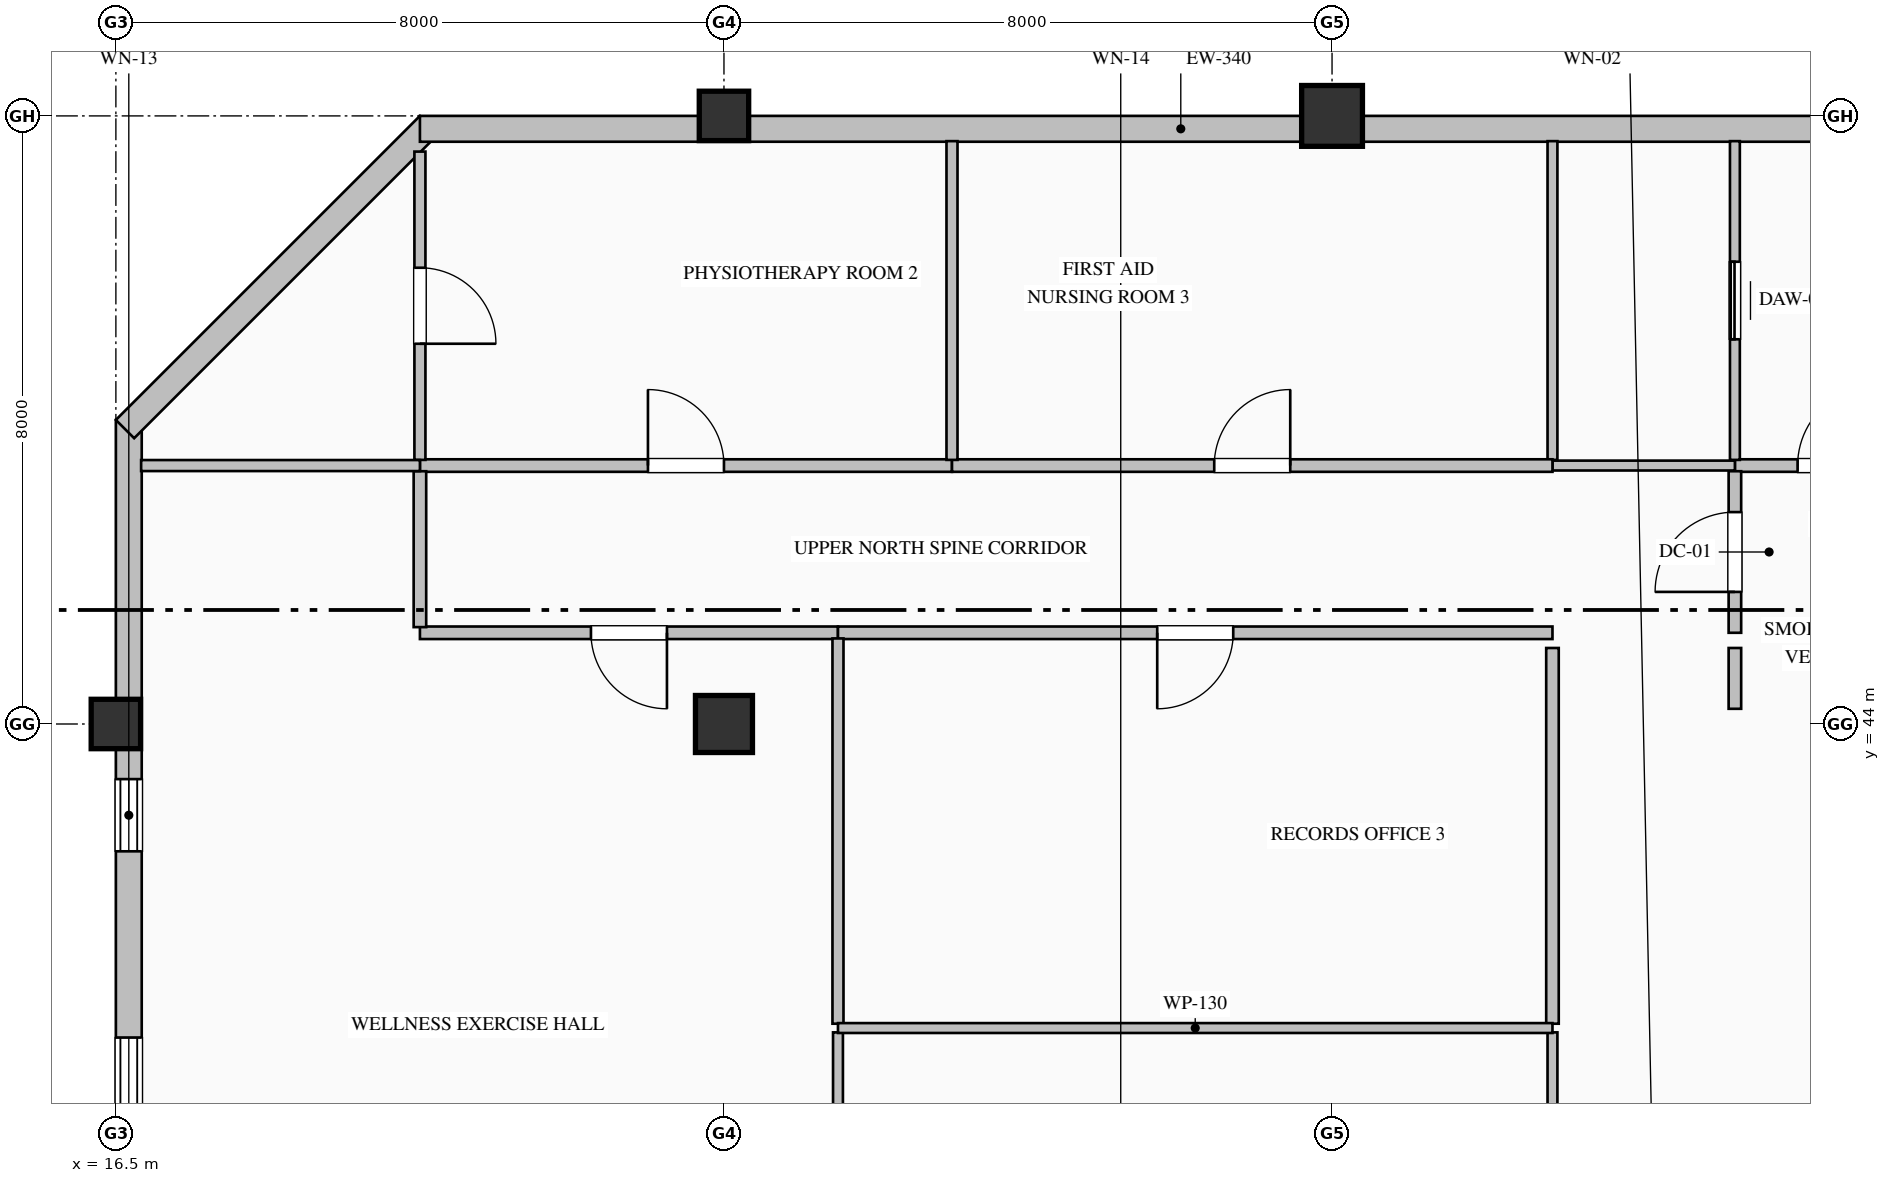
"""IFC4 building model, lengths in metres.
Left out: names, types, materials, properties, quantities, classifications, styles, units other than length and angle.
Written with IfcOpenShell. Run it as: python <this file> out.ifc"""

import sys

from ifc_helpers import new_model, si_unit, direction, frame, frame_2d, origin, origin_2d, place, context, subcontext, project, spatial, rectangle, hollow_rectangle, extrude, element, fill, save


model = new_model("IFC4")
c1 = context("Model", 3, precision=1e-05, world=origin(), true_north=direction((0.0, 1.0)))
c2 = subcontext(c1, "Body", "Model", "MODEL_VIEW")
j1 = project(units=[si_unit("LENGTHUNIT", "METRE"), si_unit("PLANEANGLEUNIT", "RADIAN")], contexts=[c1])
p1 = place(None, origin())
s1 = spatial("IfcSite", under=j1, at=p1, CompositionType="ELEMENT")
p2 = place(p1, origin())
s2 = spatial("IfcBuilding", under=s1, at=p2, CompositionType="ELEMENT")
p3 = place(p2, frame((0.0, 0.0, 339.2)))
s3 = spatial("IfcBuildingStorey", under=s2, at=p3, CompositionType="ELEMENT", Elevation=339.2)
p4 = place(p3, frame((16.5, 44.0, 0.0), z_axis=(0.0, 0.0, 1.0), x_axis=(1.0, 0.0, 0.0)))
e1 = element("IfcColumn", 1, at=p4, inside=s3, PredefinedType="COLUMN", context=c2, shape_type="SweptSolid", body=[
    extrude(hollow_rectangle(XDim=0.65, YDim=0.65, WallThickness=0.028, at=origin_2d()), origin(), (0.0, 0.0, 1.0), 4.0),
])
p5 = place(p3, frame((24.5, 44.0, 0.0), z_axis=(0.0, 0.0, 1.0), x_axis=(1.0, 0.0, 0.0)))
e2 = element("IfcColumn", 2, at=p5, inside=s3, PredefinedType="COLUMN", context=c2, shape_type="SweptSolid", body=[
    extrude(rectangle(XDim=0.75, YDim=0.75, at=origin_2d()), origin(), (0.0, 0.0, 1.0), 4.0),
])
p6 = place(p3, frame((24.5, 52.0, 0.0), z_axis=(0.0, 0.0, 1.0), x_axis=(1.0, 0.0, 0.0)))
e3 = element("IfcColumn", 3, at=p6, inside=s3, PredefinedType="COLUMN", context=c2, shape_type="SweptSolid", body=[
    extrude(hollow_rectangle(XDim=0.65, YDim=0.65, WallThickness=0.028, at=origin_2d()), origin(), (0.0, 0.0, 1.0), 4.0),
])
p7 = place(p3, frame((32.5, 52.0, 0.0), z_axis=(0.0, 0.0, 1.0), x_axis=(1.0, 0.0, 0.0)))
e4 = element("IfcColumn", 4, at=p7, inside=s3, PredefinedType="COLUMN", context=c2, shape_type="SweptSolid", body=[
    extrude(hollow_rectangle(XDim=0.8, YDim=0.8, WallThickness=0.032, at=origin_2d()), origin(), (0.0, 0.0, 1.0), 4.0),
])
p8 = place(p3, frame((16.67, 32.0, 0.0), z_axis=(0.0, 0.0, 1.0), x_axis=(0.0, 1.0, 0.0)))
e5 = element("IfcWall", 5, at=p8, inside=s3, PredefinedType="SOLIDWALL", context=c2, shape_type="SweptSolid", body=[
    extrude(rectangle(XDim=16.0, YDim=0.34, at=frame_2d((8.0, 0.0))), origin(), (0.0, 0.0, 1.0), 3.335),
])
p9 = place(p8, frame((6.525, 0.0, 0.9)))
e6 = element("IfcOpeningElement", 6, at=p9, cuts=e5, PredefinedType="OPENING", context=c2, shape_type="SweptSolid", body=[
    extrude(rectangle(XDim=1.35, YDim=1.85, at=frame_2d((0.675, 0.925))), frame((0.0, 0.18, 0.0), z_axis=(0.0, -1.0, 0.0), x_axis=(1.0, 0.0, 0.0)), (0.0, 0.0, 1.0), 0.36),
])
p10 = place(p8, frame((10.325, 0.0, 0.9)))
e7 = element("IfcOpeningElement", 7, at=p10, cuts=e5, PredefinedType="OPENING", context=c2, shape_type="SweptSolid", body=[
    extrude(rectangle(XDim=0.95, YDim=1.85, at=frame_2d((0.475, 0.925))), frame((0.0, 0.18, 0.0), z_axis=(0.0, -1.0, 0.0), x_axis=(1.0, 0.0, 0.0)), (0.0, 0.0, 1.0), 0.36),
])
p11 = place(p3, frame((16.62, 47.88, 0.0), z_axis=(0.0, 0.0, 1.0), x_axis=(0.707106781187, 0.707106781187, 0.0)))
e8 = element("IfcWall", 8, at=p11, inside=s3, PredefinedType="SOLIDWALL", context=c2, shape_type="SweptSolid", body=[
    extrude(rectangle(XDim=5.657, YDim=0.34, at=frame_2d((2.828, 0.0))), origin(), (0.0, 0.0, 1.0), 3.785),
])
p12 = place(p3, frame((20.5, 51.83, 0.0), z_axis=(0.0, 0.0, 1.0), x_axis=(1.0, 0.0, 0.0)))
e9 = element("IfcWall", 9, at=p12, inside=s3, PredefinedType="SOLIDWALL", context=c2, shape_type="SweptSolid", body=[
    extrude(rectangle(XDim=20.02, YDim=0.34, at=frame_2d((10.01, 0.0))), origin(), (0.0, 0.0, 1.0), 3.335),
])
p13 = place(p3, frame((37.8, 47.4, 0.0), z_axis=(0.0, 0.0, 1.0), x_axis=(1.0, 0.0, 0.0)))
e10 = element("IfcWall", 10, at=p13, inside=s3, PredefinedType="PARTITIONING", context=c2, shape_type="SweptSolid", body=[
    extrude(rectangle(XDim=2.7, YDim=0.165, at=frame_2d((1.35, 0.0))), origin(), (0.0, 0.0, 1.0), 3.785),
])
p14 = place(p13, frame((0.825, 0.0, 0.0)))
e11 = element("IfcOpeningElement", 11, at=p14, cuts=e10, PredefinedType="OPENING", context=c2, shape_type="SweptSolid", body=[
    extrude(rectangle(XDim=1.05, YDim=2.15, at=frame_2d((0.525, 1.075))), frame((0.0, 0.093, 0.0), z_axis=(0.0, -1.0, 0.0), x_axis=(1.0, 0.0, 0.0)), (0.0, 0.0, 1.0), 0.185),
])
p15 = place(p3, frame((37.8, 45.2, 0.0), z_axis=(0.0, 0.0, 1.0), x_axis=(0.0, 1.0, 0.0)))
e12 = element("IfcWall", 12, at=p15, inside=s3, PredefinedType="PARTITIONING", context=c2, shape_type="SweptSolid", body=[
    extrude(rectangle(XDim=2.125, YDim=0.165, at=frame_2d((1.063, 0.0))), origin(), (0.0, 0.0, 1.0), 3.785),
])
p16 = place(p15, frame((0.538, 0.0, 0.0)))
e13 = element("IfcOpeningElement", 13, at=p16, cuts=e12, PredefinedType="OPENING", context=c2, shape_type="SweptSolid", body=[
    extrude(rectangle(XDim=1.05, YDim=2.15, at=frame_2d((0.525, 1.075))), frame((0.0, 0.093, 0.0), z_axis=(0.0, -1.0, 0.0), x_axis=(1.0, 0.0, 0.0)), (0.0, 0.0, 1.0), 0.185),
])
p17 = place(p3, frame((37.8, 44.2, 0.0), z_axis=(0.0, 0.0, 1.0), x_axis=(0.0, 1.0, 0.0)))
e14 = element("IfcWall", 14, at=p17, inside=s3, PredefinedType="PARTITIONING", context=c2, shape_type="SweptSolid", body=[
    extrude(rectangle(XDim=0.8, YDim=0.165, at=frame_2d((0.4, 0.0))), origin(), (0.0, 0.0, 1.0), 3.785),
])
p18 = place(p3, frame((37.8, 47.475, 0.0), z_axis=(0.0, 0.0, 1.0), x_axis=(0.0, 1.0, 0.0)))
e15 = element("IfcWall", 15, at=p18, inside=s3, PredefinedType="PARTITIONING", context=c2, shape_type="SweptSolid", body=[
    extrude(rectangle(XDim=4.193, YDim=0.13, at=frame_2d((2.097, 0.0))), origin(), (0.0, 0.0, 1.0), 3.785),
])
p19 = place(p18, frame((1.587, 0.0, 0.0)))
e16 = element("IfcOpeningElement", 16, at=p19, cuts=e15, PredefinedType="OPENING", context=c2, shape_type="SweptSolid", body=[
    extrude(rectangle(XDim=1.02, YDim=2.15, at=frame_2d((0.51, 1.075))), frame((0.0, 0.075, 0.0), z_axis=(0.0, -1.0, 0.0), x_axis=(1.0, 0.0, 0.0)), (0.0, 0.0, 1.0), 0.15),
])
p20 = place(p3, frame((37.8, 47.4, 0.0), z_axis=(0.0, 0.0, 1.0), x_axis=(-1.0, 0.0, 0.0)))
e17 = element("IfcWall", 17, at=p20, inside=s3, PredefinedType="PARTITIONING", context=c2, shape_type="SweptSolid", body=[
    extrude(rectangle(XDim=2.4, YDim=0.13, at=frame_2d((1.2, 0.0))), origin(), (0.0, 0.0, 1.0), 3.785),
])
p21 = place(p3, frame((35.4, 47.475, 0.0), z_axis=(0.0, 0.0, 1.0), x_axis=(0.0, 1.0, 0.0)))
e18 = element("IfcWall", 18, at=p21, inside=s3, PredefinedType="PARTITIONING", context=c2, shape_type="SweptSolid", body=[
    extrude(rectangle(XDim=4.193, YDim=0.13, at=frame_2d((2.097, 0.0))), origin(), (0.0, 0.0, 1.0), 3.785),
])
p22 = place(p3, frame((20.5, 47.4, 0.0), z_axis=(0.0, 0.0, 1.0), x_axis=(1.0, 0.0, 0.0)))
e19 = element("IfcWall", 19, at=p22, inside=s3, PredefinedType="PARTITIONING", context=c2, shape_type="SweptSolid", body=[
    extrude(rectangle(XDim=7.0, YDim=0.165, at=frame_2d((3.5, 0.0))), origin(), (0.0, 0.0, 1.0), 3.785),
])
p23 = place(p22, frame((3.0, 0.0, 0.0)))
e20 = element("IfcOpeningElement", 20, at=p23, cuts=e19, PredefinedType="OPENING", context=c2, shape_type="SweptSolid", body=[
    extrude(rectangle(XDim=1.0, YDim=2.15, at=frame_2d((0.5, 1.075))), frame((0.0, 0.093, 0.0), z_axis=(0.0, -1.0, 0.0), x_axis=(1.0, 0.0, 0.0)), (0.0, 0.0, 1.0), 0.185),
])
p24 = place(p3, frame((27.5, 47.4, 0.0), z_axis=(0.0, 0.0, 1.0), x_axis=(1.0, 0.0, 0.0)))
e21 = element("IfcWall", 21, at=p24, inside=s3, PredefinedType="PARTITIONING", context=c2, shape_type="SweptSolid", body=[
    extrude(rectangle(XDim=7.9, YDim=0.165, at=frame_2d((3.95, 0.0))), origin(), (0.0, 0.0, 1.0), 3.785),
])
p25 = place(p24, frame((3.45, 0.0, 0.0)))
e22 = element("IfcOpeningElement", 22, at=p25, cuts=e21, PredefinedType="OPENING", context=c2, shape_type="SweptSolid", body=[
    extrude(rectangle(XDim=1.0, YDim=2.15, at=frame_2d((0.5, 1.075))), frame((0.0, 0.093, 0.0), z_axis=(0.0, -1.0, 0.0), x_axis=(1.0, 0.0, 0.0)), (0.0, 0.0, 1.0), 0.185),
])
p26 = place(p3, frame((26.0, 45.2, 0.0), z_axis=(0.0, 0.0, 1.0), x_axis=(-1.0, 0.0, 0.0)))
e23 = element("IfcWall", 23, at=p26, inside=s3, PredefinedType="PARTITIONING", context=c2, shape_type="SweptSolid", body=[
    extrude(rectangle(XDim=5.5, YDim=0.165, at=frame_2d((2.75, 0.0))), origin(), (0.0, 0.0, 1.0), 3.785),
])
p27 = place(p26, frame((2.25, 0.0, 0.0)))
e24 = element("IfcOpeningElement", 24, at=p27, cuts=e23, PredefinedType="OPENING", context=c2, shape_type="SweptSolid", body=[
    extrude(rectangle(XDim=1.0, YDim=2.15, at=frame_2d((0.5, 1.075))), frame((0.0, 0.093, 0.0), z_axis=(0.0, -1.0, 0.0), x_axis=(1.0, 0.0, 0.0)), (0.0, 0.0, 1.0), 0.185),
])
p28 = place(p3, frame((20.5, 45.274, 0.0), z_axis=(0.0, 0.0, 1.0), x_axis=(0.0, 1.0, 0.0)))
e25 = element("IfcWall", 25, at=p28, inside=s3, PredefinedType="PARTITIONING", context=c2, shape_type="SweptSolid", body=[
    extrude(rectangle(XDim=2.051, YDim=0.165, at=frame_2d((1.025, 0.0))), origin(), (0.0, 0.0, 1.0), 3.785),
])
p29 = place(p3, frame((35.4, 45.2, 0.0), z_axis=(0.0, 0.0, 1.0), x_axis=(-1.0, 0.0, 0.0)))
e26 = element("IfcWall", 26, at=p29, inside=s3, PredefinedType="PARTITIONING", context=c2, shape_type="SweptSolid", body=[
    extrude(rectangle(XDim=9.4, YDim=0.165, at=frame_2d((4.7, 0.0))), origin(), (0.0, 0.0, 1.0), 3.785),
])
p30 = place(p29, frame((4.2, 0.0, 0.0)))
e27 = element("IfcOpeningElement", 27, at=p30, cuts=e26, PredefinedType="OPENING", context=c2, shape_type="SweptSolid", body=[
    extrude(rectangle(XDim=1.0, YDim=2.15, at=frame_2d((0.5, 1.075))), frame((0.0, 0.093, 0.0), z_axis=(0.0, -1.0, 0.0), x_axis=(1.0, 0.0, 0.0)), (0.0, 0.0, 1.0), 0.185),
])
p31 = place(p3, frame((35.4, 34.057, 0.0), z_axis=(0.0, 0.0, 1.0), x_axis=(0.0, 1.0, 0.0)))
e28 = element("IfcWall", 28, at=p31, inside=s3, PredefinedType="PARTITIONING", context=c2, shape_type="SweptSolid", body=[
    extrude(rectangle(XDim=5.886, YDim=0.13, at=frame_2d((2.943, 0.0))), origin(), (0.0, 0.0, 1.0), 3.785),
])
p32 = place(p31, frame((2.443, 0.0, 0.0)))
e29 = element("IfcOpeningElement", 29, at=p32, cuts=e28, PredefinedType="OPENING", context=c2, shape_type="SweptSolid", body=[
    extrude(rectangle(XDim=1.0, YDim=2.15, at=frame_2d((0.5, 1.075))), frame((0.0, 0.075, 0.0), z_axis=(0.0, -1.0, 0.0), x_axis=(1.0, 0.0, 0.0)), (0.0, 0.0, 1.0), 0.15),
])
p33 = place(p3, frame((35.4, 40.057, 0.0), z_axis=(0.0, 0.0, 1.0), x_axis=(0.0, 1.0, 0.0)))
e30 = element("IfcWall", 30, at=p33, inside=s3, PredefinedType="PARTITIONING", context=c2, shape_type="SweptSolid", body=[
    extrude(rectangle(XDim=4.943, YDim=0.165, at=frame_2d((2.472, 0.0))), origin(), (0.0, 0.0, 1.0), 3.785),
])
p34 = place(p3, frame((20.5, 51.531, 0.0), z_axis=(0.0, 0.0, 1.0), x_axis=(0.0, -1.0, 0.0)))
e31 = element("IfcWall", 31, at=p34, inside=s3, PredefinedType="PARTITIONING", context=c2, shape_type="SweptSolid", body=[
    extrude(rectangle(XDim=4.056, YDim=0.145, at=frame_2d((2.028, 0.0))), origin(), (0.0, 0.0, 1.0), 3.785),
])
p35 = place(p34, frame((1.528, 0.0, 0.0)))
e32 = element("IfcOpeningElement", 32, at=p35, cuts=e31, PredefinedType="OPENING", context=c2, shape_type="SweptSolid", body=[
    extrude(rectangle(XDim=1.0, YDim=2.15, at=frame_2d((0.5, 1.075))), frame((0.0, 0.083, 0.0), z_axis=(0.0, -1.0, 0.0), x_axis=(1.0, 0.0, 0.0)), (0.0, 0.0, 1.0), 0.165),
])
p36 = place(p3, frame((20.5, 47.4, 0.0), z_axis=(0.0, 0.0, 1.0), x_axis=(-1.0, 0.0, 0.0)))
e33 = element("IfcWall", 33, at=p36, inside=s3, PredefinedType="PARTITIONING", context=c2, shape_type="SweptSolid", body=[
    extrude(rectangle(XDim=3.668, YDim=0.145, at=frame_2d((1.834, 0.0))), origin(), (0.0, 0.0, 1.0), 3.785),
])
p37 = place(p3, frame((27.5, 51.668, 0.0), z_axis=(0.0, 0.0, 1.0), x_axis=(0.0, -1.0, 0.0)))
e34 = element("IfcWall", 34, at=p37, inside=s3, PredefinedType="PARTITIONING", context=c2, shape_type="SweptSolid", body=[
    extrude(rectangle(XDim=4.193, YDim=0.145, at=frame_2d((2.097, 0.0))), origin(), (0.0, 0.0, 1.0), 3.785),
])
p38 = place(p3, frame((26.0, 39.943, 0.0), z_axis=(0.0, 0.0, 1.0), x_axis=(0.0, -1.0, 0.0)))
e35 = element("IfcWall", 35, at=p38, inside=s3, PredefinedType="PARTITIONING", context=c2, shape_type="SweptSolid", body=[
    extrude(rectangle(XDim=5.886, YDim=0.13, at=frame_2d((2.943, 0.0))), origin(), (0.0, 0.0, 1.0), 3.785),
])
p39 = place(p3, frame((26.0, 45.125, 0.0), z_axis=(0.0, 0.0, 1.0), x_axis=(0.0, -1.0, 0.0)))
e36 = element("IfcWall", 36, at=p39, inside=s3, PredefinedType="PARTITIONING", context=c2, shape_type="SweptSolid", body=[
    extrude(rectangle(XDim=5.069, YDim=0.145, at=frame_2d((2.534, 0.0))), origin(), (0.0, 0.0, 1.0), 3.785),
])
p40 = place(p3, frame((26.0, 40.0, 0.0), z_axis=(0.0, 0.0, 1.0), x_axis=(1.0, 0.0, 0.0)))
e37 = element("IfcWall", 37, at=p40, inside=s3, PredefinedType="PARTITIONING", context=c2, shape_type="SweptSolid", body=[
    extrude(rectangle(XDim=9.4, YDim=0.13, at=frame_2d((4.7, 0.0))), origin(), (0.0, 0.0, 1.0), 3.785),
])
p41 = place(p9, origin())
e38 = element("IfcWindow", 38, at=p41, inside=s3, PartitioningType="DOUBLE_PANEL_VERTICAL", PredefinedType="WINDOW", context=c2, shape_type="SweptSolid", body=[
    extrude(rectangle(XDim=1.35, YDim=1.85, at=frame_2d((0.675, 0.925))), frame((0.0, 0.15, 0.0), z_axis=(0.0, -1.0, 0.0), x_axis=(1.0, 0.0, 0.0)), (0.0, 0.0, 1.0), 0.06),
])
fill(e6, e38)
p42 = place(p10, origin())
e39 = element("IfcWindow", 39, at=p42, inside=s3, PartitioningType="SINGLE_PANEL", PredefinedType="WINDOW", context=c2, shape_type="SweptSolid", body=[
    extrude(rectangle(XDim=0.95, YDim=1.85, at=frame_2d((0.475, 0.925))), frame((0.0, 0.15, 0.0), z_axis=(0.0, -1.0, 0.0), x_axis=(1.0, 0.0, 0.0)), (0.0, 0.0, 1.0), 0.06),
])
fill(e7, e39)
p43 = place(p14, origin())
e40 = element("IfcDoor", 40, at=p43, inside=s3, OperationType="SINGLE_SWING_RIGHT", PredefinedType="DOOR", context=c2, shape_type="SweptSolid", body=[
    extrude(rectangle(XDim=1.05, YDim=2.15, at=frame_2d((0.525, 1.075))), frame((0.0, 0.025, 0.0), z_axis=(0.0, -1.0, 0.0), x_axis=(1.0, 0.0, 0.0)), (0.0, 0.0, 1.0), 0.05),
])
fill(e11, e40)
p44 = place(p16, origin())
e41 = element("IfcDoor", 41, at=p44, inside=s3, OperationType="SINGLE_SWING_LEFT", PredefinedType="DOOR", context=c2, shape_type="SweptSolid", body=[
    extrude(rectangle(XDim=1.05, YDim=2.15, at=frame_2d((0.525, 1.075))), frame((0.0, 0.025, 0.0), z_axis=(0.0, -1.0, 0.0), x_axis=(1.0, 0.0, 0.0)), (0.0, 0.0, 1.0), 0.05),
])
fill(e13, e41)
p45 = place(p19, origin())
e42 = element("IfcDoor", 42, at=p45, inside=s3, OperationType="SLIDING_TO_LEFT", PredefinedType="DOOR", context=c2, shape_type="SweptSolid", body=[
    extrude(rectangle(XDim=1.02, YDim=2.15, at=frame_2d((0.51, 1.075))), frame((0.0, 0.025, 0.0), z_axis=(0.0, -1.0, 0.0), x_axis=(1.0, 0.0, 0.0)), (0.0, 0.0, 1.0), 0.05),
])
fill(e16, e42)
p46 = place(p35, origin())
e43 = element("IfcDoor", 43, at=p46, inside=s3, OperationType="SINGLE_SWING_RIGHT", PredefinedType="DOOR", context=c2, shape_type="SweptSolid", body=[
    extrude(rectangle(XDim=1.0, YDim=2.15, at=frame_2d((0.5, 1.075))), frame((0.0, 0.025, 0.0), z_axis=(0.0, -1.0, 0.0), x_axis=(1.0, 0.0, 0.0)), (0.0, 0.0, 1.0), 0.05),
])
fill(e32, e43)
p47 = place(p23, origin())
e44 = element("IfcDoor", 44, at=p47, inside=s3, OperationType="SINGLE_SWING_LEFT", PredefinedType="DOOR", context=c2, shape_type="SweptSolid", body=[
    extrude(rectangle(XDim=1.0, YDim=2.15, at=frame_2d((0.5, 1.075))), frame((0.0, 0.025, 0.0), z_axis=(0.0, -1.0, 0.0), x_axis=(1.0, 0.0, 0.0)), (0.0, 0.0, 1.0), 0.05),
])
fill(e20, e44)
p48 = place(p25, origin())
e45 = element("IfcDoor", 45, at=p48, inside=s3, OperationType="SINGLE_SWING_RIGHT", PredefinedType="DOOR", context=c2, shape_type="SweptSolid", body=[
    extrude(rectangle(XDim=1.0, YDim=2.15, at=frame_2d((0.5, 1.075))), frame((0.0, 0.025, 0.0), z_axis=(0.0, -1.0, 0.0), x_axis=(1.0, 0.0, 0.0)), (0.0, 0.0, 1.0), 0.05),
])
fill(e22, e45)
p49 = place(p27, origin())
e46 = element("IfcDoor", 46, at=p49, inside=s3, OperationType="SINGLE_SWING_LEFT", PredefinedType="DOOR", context=c2, shape_type="SweptSolid", body=[
    extrude(rectangle(XDim=1.0, YDim=2.15, at=frame_2d((0.5, 1.075))), frame((0.0, 0.025, 0.0), z_axis=(0.0, -1.0, 0.0), x_axis=(1.0, 0.0, 0.0)), (0.0, 0.0, 1.0), 0.05),
])
fill(e24, e46)
p50 = place(p30, origin())
e47 = element("IfcDoor", 47, at=p50, inside=s3, OperationType="SINGLE_SWING_RIGHT", PredefinedType="DOOR", context=c2, shape_type="SweptSolid", body=[
    extrude(rectangle(XDim=1.0, YDim=2.15, at=frame_2d((0.5, 1.075))), frame((0.0, 0.025, 0.0), z_axis=(0.0, -1.0, 0.0), x_axis=(1.0, 0.0, 0.0)), (0.0, 0.0, 1.0), 0.05),
])
fill(e27, e47)
save(model, sys.argv[1])
